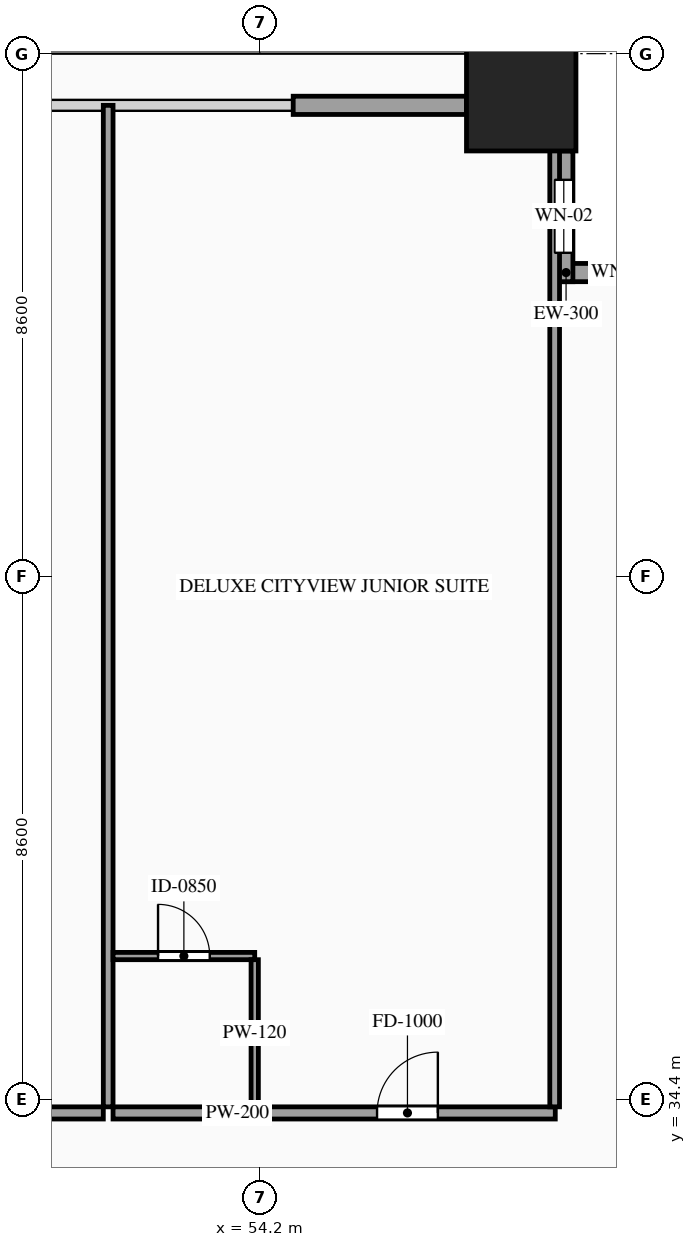
"""IFC4 building model, lengths in metres.
Left out: names, types, materials, properties, quantities, classifications, styles, units other than length and angle.
Written with IfcOpenShell. Run it as: python <this file> out.ifc"""

import sys

from ifc_helpers import new_model, si_unit, direction, frame, frame_2d, origin, origin_2d, place, context, subcontext, project, spatial, rectangle, hollow_rectangle, extrude, source, transform, mapped, element, fill, save


model = new_model("IFC4")
c1 = context("Model", 3, precision=1e-05, world=origin(), true_north=direction((0.0, 1.0)))
c2 = subcontext(c1, "Body", "Model", "MODEL_VIEW")
j1 = project(units=[si_unit("LENGTHUNIT", "METRE"), si_unit("PLANEANGLEUNIT", "RADIAN")], contexts=[c1])
p1 = place(None, origin())
s1 = spatial("IfcSite", under=j1, at=p1, CompositionType="ELEMENT")
p2 = place(p1, origin())
s2 = spatial("IfcBuilding", under=s1, at=p2, CompositionType="ELEMENT")
p3 = place(p2, frame((0.0, 0.0, 34.2)))
s3 = spatial("IfcBuildingStorey", under=s2, at=p3, CompositionType="ELEMENT", Elevation=34.2)
m1 = source(origin(), c2, "Body", "SweptSolid", [
    extrude(hollow_rectangle(XDim=1.8, YDim=1.8, WallThickness=0.08, at=origin_2d()), origin(), (0.0, 0.0, 1.0), 3.6),
])
p4 = place(p3, frame((58.5, 50.9, 0.0), z_axis=(0.0, 0.0, 1.0), x_axis=(1.0, 0.0, 0.0)))
e1 = element("IfcColumn", 1, at=p4, inside=s3, PredefinedType="COLUMN", context=c2, shape_type="MappedRepresentation", body=[
    mapped(m1, transform((0.0, 0.0, 0.0), scale=1.0)),
])
p5 = place(p3, frame((61.2, 48.0, 0.0), z_axis=(0.0, 0.0, 1.0), x_axis=(-1.0, 0.0, 0.0)))
e2 = element("IfcWall", 2, at=p5, inside=s3, PredefinedType="SOLIDWALL", context=c2, shape_type="SweptSolid", body=[
    extrude(rectangle(XDim=2.15, YDim=0.3, at=frame_2d((1.075, 0.0))), origin(), (0.0, 0.0, 1.0), 3.38),
])
p6 = place(p5, frame((0.625, 0.0, 0.85)))
e3 = element("IfcOpeningElement", 3, at=p6, cuts=e2, PredefinedType="OPENING", context=c2, shape_type="SweptSolid", body=[
    extrude(rectangle(XDim=0.9, YDim=1.5, at=frame_2d((0.45, 0.75))), frame((0.0, 0.165, 0.0), z_axis=(0.0, -1.0, 0.0), x_axis=(1.0, 0.0, 0.0)), (0.0, 0.0, 1.0), 0.33),
])
p7 = place(p3, frame((59.2, 47.85, 0.0), z_axis=(0.0, 0.0, 1.0), x_axis=(0.0, 1.0, 0.0)))
e4 = element("IfcWall", 4, at=p7, inside=s3, PredefinedType="SOLIDWALL", context=c2, shape_type="SweptSolid", body=[
    extrude(rectangle(XDim=2.15, YDim=0.3, at=frame_2d((1.075, 0.0))), origin(), (0.0, 0.0, 1.0), 3.38),
])
p8 = place(p7, frame((0.475, 0.0, 0.85)))
e5 = element("IfcOpeningElement", 5, at=p8, cuts=e4, PredefinedType="OPENING", context=c2, shape_type="SweptSolid", body=[
    extrude(rectangle(XDim=1.2, YDim=2.1, at=frame_2d((0.6, 1.05))), frame((0.0, 0.165, 0.0), z_axis=(0.0, -1.0, 0.0), x_axis=(1.0, 0.0, 0.0)), (0.0, 0.0, 1.0), 0.33),
])
m2 = source(origin(), c2, "Body", "SweptSolid", [
    extrude(rectangle(XDim=2.85, YDim=0.3, at=frame_2d((1.425, 0.0))), origin(), (0.0, 0.0, 1.0), 2.775),
])
p9 = place(p3, frame((54.75, 50.75, 0.0), z_axis=(0.0, 0.0, 1.0), x_axis=(1.0, 0.0, 0.0)))
e6 = element("IfcWall", 6, at=p9, inside=s3, PredefinedType="SOLIDWALL", context=c2, shape_type="MappedRepresentation", body=[
    mapped(m2, transform((0.0, 0.0, 0.0), scale=1.0)),
])
p10 = place(p3, frame((44.433, 34.18, 0.0), z_axis=(0.0, 0.0, 1.0), x_axis=(1.0, 0.0, 0.0)))
e7 = element("IfcWall", 7, at=p10, inside=s3, PredefinedType="PARTITIONING", context=c2, shape_type="SweptSolid", body=[
    extrude(rectangle(XDim=7.194, YDim=0.2, at=frame_2d((3.597, 0.0))), origin(), (0.0, 0.0, 1.0), 3.38),
])
p11 = place(p10, frame((4.302, 0.0, 0.0)))
e8 = element("IfcOpeningElement", 8, at=p11, cuts=e7, PredefinedType="OPENING", context=c2, shape_type="SweptSolid", body=[
    extrude(rectangle(XDim=1.0, YDim=2.2, at=frame_2d((0.5, 1.1))), frame((0.0, 0.115, 0.0), z_axis=(0.0, -1.0, 0.0), x_axis=(1.0, 0.0, 0.0)), (0.0, 0.0, 1.0), 0.23),
])
m3 = source(origin(), c2, "Body", "SweptSolid", [
    extrude(rectangle(XDim=16.47, YDim=0.16, at=frame_2d((8.235, 0.0))), origin(), (0.0, 0.0, 1.0), 3.38),
])
p12 = place(p3, frame((51.707, 34.28, 0.0), z_axis=(0.0, 0.0, 1.0), x_axis=(0.0, 1.0, 0.0)))
e9 = element("IfcWall", 9, at=p12, inside=s3, PredefinedType="PARTITIONING", context=c2, shape_type="MappedRepresentation", body=[
    mapped(m3, transform((0.0, 0.0, 0.0), scale=1.0)),
])
p13 = place(p3, frame((51.787, 34.18, 0.0), z_axis=(0.0, 0.0, 1.0), x_axis=(1.0, 0.0, 0.0)))
e10 = element("IfcWall", 10, at=p13, inside=s3, PredefinedType="PARTITIONING", context=c2, shape_type="SweptSolid", body=[
    extrude(rectangle(XDim=7.273, YDim=0.2, at=frame_2d((3.636, 0.0))), origin(), (0.0, 0.0, 1.0), 3.38),
])
p14 = place(p13, frame((4.342, 0.0, 0.0)))
e11 = element("IfcOpeningElement", 11, at=p14, cuts=e10, PredefinedType="OPENING", context=c2, shape_type="SweptSolid", body=[
    extrude(rectangle(XDim=1.0, YDim=2.2, at=frame_2d((0.5, 1.1))), frame((0.0, 0.115, 0.0), z_axis=(0.0, -1.0, 0.0), x_axis=(1.0, 0.0, 0.0)), (0.0, 0.0, 1.0), 0.23),
])
m4 = source(origin(), c2, "Body", "SweptSolid", [
    extrude(rectangle(XDim=16.32, YDim=0.16, at=frame_2d((8.16, 0.0))), origin(), (0.0, 0.0, 1.0), 3.38),
])
p15 = place(p3, frame((59.05, 34.28, 0.0), z_axis=(0.0, 0.0, 1.0), x_axis=(0.0, 1.0, 0.0)))
e12 = element("IfcWall", 12, at=p15, inside=s3, PredefinedType="PARTITIONING", context=c2, shape_type="MappedRepresentation", body=[
    mapped(m4, transform((0.0, 0.0, 0.0), scale=1.0)),
])
p16 = place(p3, frame((51.787, 36.76, 0.0), z_axis=(0.0, 0.0, 1.0), x_axis=(1.0, 0.0, 0.0)))
e13 = element("IfcWall", 13, at=p16, inside=s3, PredefinedType="PARTITIONING", context=c2, shape_type="SweptSolid", body=[
    extrude(rectangle(XDim=2.33, YDim=0.12, at=frame_2d((1.165, 0.0))), origin(), (0.0, 0.0, 1.0), 3.38),
])
p17 = place(p16, frame((0.74, 0.0, 0.0)))
e14 = element("IfcOpeningElement", 14, at=p17, cuts=e13, PredefinedType="OPENING", context=c2, shape_type="SweptSolid", body=[
    extrude(rectangle(XDim=0.85, YDim=2.1, at=frame_2d((0.425, 1.05))), frame((0.0, 0.075, 0.0), z_axis=(0.0, -1.0, 0.0), x_axis=(1.0, 0.0, 0.0)), (0.0, 0.0, 1.0), 0.15),
])
m5 = source(origin(), c2, "Body", "SweptSolid", [
    extrude(rectangle(XDim=2.42, YDim=0.12, at=frame_2d((1.21, 0.0))), origin(), (0.0, 0.0, 1.0), 3.38),
])
p18 = place(p3, frame((54.117, 34.28, 0.0), z_axis=(0.0, 0.0, 1.0), x_axis=(0.0, 1.0, 0.0)))
e15 = element("IfcWall", 15, at=p18, inside=s3, PredefinedType="PARTITIONING", context=c2, shape_type="MappedRepresentation", body=[
    mapped(m5, transform((0.0, 0.0, 0.0), scale=1.0)),
])
m6 = source(origin(), c2, "Body", "SweptSolid", [
    extrude(rectangle(XDim=0.9, YDim=1.5, at=frame_2d((0.45, 0.75))), frame((0.0, 0.03, 0.0), z_axis=(0.0, -1.0, 0.0), x_axis=(1.0, 0.0, 0.0)), (0.0, 0.0, 1.0), 0.06),
])
p19 = place(p6, origin())
e16 = element("IfcWindow", 16, at=p19, inside=s3, PartitioningType="SINGLE_PANEL", PredefinedType="WINDOW", context=c2, shape_type="MappedRepresentation", body=[
    mapped(m6, transform((0.0, 0.0, 0.0), scale=1.0)),
])
fill(e3, e16)
m7 = source(origin(), c2, "Body", "SweptSolid", [
    extrude(rectangle(XDim=1.2, YDim=2.1, at=frame_2d((0.6, 1.05))), frame((0.0, 0.03, 0.0), z_axis=(0.0, -1.0, 0.0), x_axis=(1.0, 0.0, 0.0)), (0.0, 0.0, 1.0), 0.06),
])
p20 = place(p8, origin())
e17 = element("IfcWindow", 17, at=p20, inside=s3, PartitioningType="SINGLE_PANEL", PredefinedType="WINDOW", context=c2, shape_type="MappedRepresentation", body=[
    mapped(m7, transform((0.0, 0.0, 0.0), scale=1.0)),
])
fill(e5, e17)
m8 = source(origin(), c2, "Body", "SweptSolid", [
    extrude(rectangle(XDim=1.0, YDim=2.2, at=frame_2d((0.5, 1.1))), frame((0.0, 0.025, 0.0), z_axis=(0.0, -1.0, 0.0), x_axis=(1.0, 0.0, 0.0)), (0.0, 0.0, 1.0), 0.05),
])
p21 = place(p14, origin())
e18 = element("IfcDoor", 18, at=p21, inside=s3, OperationType="SINGLE_SWING_RIGHT", PredefinedType="DOOR", context=c2, shape_type="MappedRepresentation", body=[
    mapped(m8, transform((0.0, 0.0, 0.0), scale=1.0)),
])
fill(e11, e18)
m9 = source(origin(), c2, "Body", "SweptSolid", [
    extrude(rectangle(XDim=0.85, YDim=2.1, at=frame_2d((0.425, 1.05))), frame((0.0, 0.025, 0.0), z_axis=(0.0, -1.0, 0.0), x_axis=(1.0, 0.0, 0.0)), (0.0, 0.0, 1.0), 0.05),
])
p22 = place(p17, origin())
e19 = element("IfcDoor", 19, at=p22, inside=s3, OperationType="SINGLE_SWING_LEFT", PredefinedType="DOOR", context=c2, shape_type="MappedRepresentation", body=[
    mapped(m9, transform((0.0, 0.0, 0.0), scale=1.0)),
])
fill(e14, e19)
save(model, sys.argv[1])
